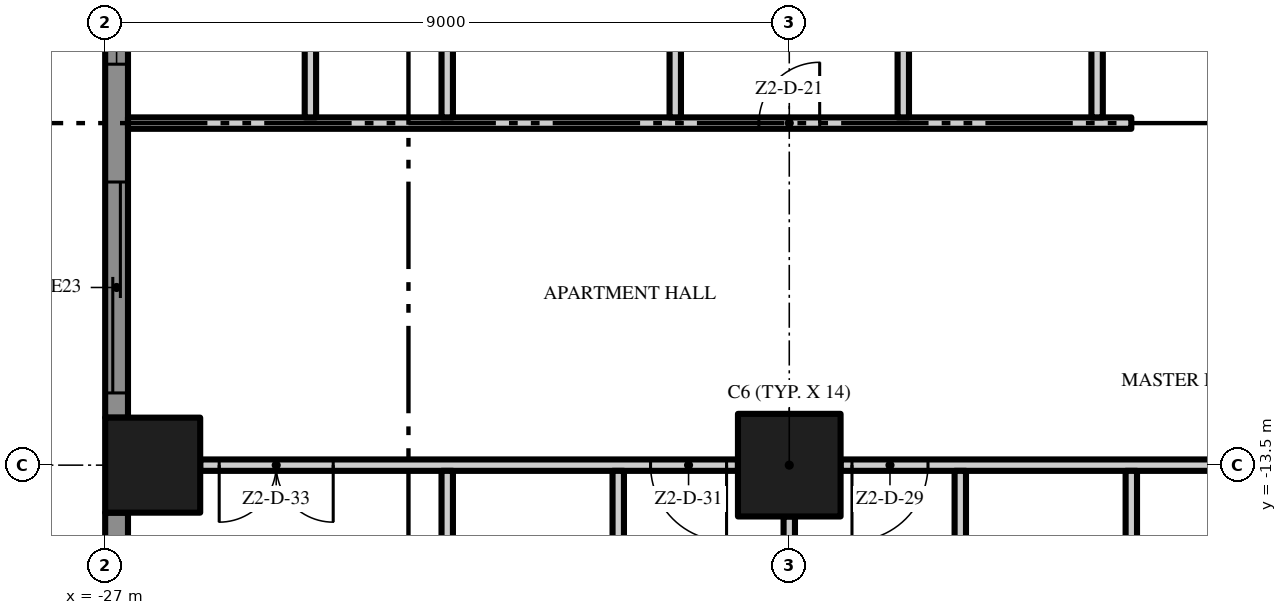
"""IFC4 building model, lengths in metres.
Left out: names, types, materials, properties, quantities, classifications, styles, units other than length and angle.
Written with IfcOpenShell. Run it as: python <this file> out.ifc"""

import sys

from ifc_helpers import new_model, si_unit, direction, frame, frame_2d, origin, origin_2d, place, context, subcontext, project, spatial, polyline, rectangle, outline, extrude, element, fill, save


model = new_model("IFC4")
c1 = context("Model", 3, precision=1e-05, world=origin(), true_north=direction((0.0, 1.0)))
c2 = subcontext(c1, "Body", "Model", "MODEL_VIEW")
j1 = project(units=[si_unit("LENGTHUNIT", "METRE"), si_unit("PLANEANGLEUNIT", "RADIAN")], contexts=[c1])
p1 = place(None, origin())
s1 = spatial("IfcSite", under=j1, at=p1, CompositionType="ELEMENT")
p2 = place(p1, origin())
s2 = spatial("IfcBuilding", under=s1, at=p2, CompositionType="ELEMENT")
p3 = place(p2, frame((0.0, 0.0, 111.2)))
s3 = spatial("IfcBuildingStorey", under=s2, at=p3, CompositionType="ELEMENT", Elevation=111.2)
p4 = place(p3, frame((-18.0, -13.5, 0.0), z_axis=(0.0, 0.0, 1.0), x_axis=(1.0, 0.0, 0.0)))
e1 = element("IfcColumn", 1, at=p4, inside=s3, PredefinedType="COLUMN", context=c2, shape_type="SweptSolid", body=[
    extrude(rectangle(XDim=1.35, YDim=1.35, at=origin_2d()), origin(), (0.0, 0.0, 1.0), 3.5),
])
p5 = place(p3, frame((-26.375, -13.5, 0.0), z_axis=(0.0, 0.0, 1.0), x_axis=(1.0, 0.0, 0.0)))
e2 = element("IfcColumn", 2, at=p5, inside=s3, PredefinedType="COLUMN", context=c2, shape_type="SweptSolid", body=[
    extrude(rectangle(XDim=1.25, YDim=1.25, at=origin_2d()), origin(), (0.0, 0.0, 1.0), 3.5),
])
p6 = place(p3, frame((-26.85, -12.875, 0.0), z_axis=(0.0, 0.0, 1.0), x_axis=(0.0, 1.0, 0.0)))
e3 = element("IfcWall", 3, at=p6, inside=s3, PredefinedType="SOLIDWALL", context=c2, shape_type="SweptSolid", body=[
    extrude(rectangle(XDim=7.75, YDim=0.3, at=frame_2d((3.875, 0.0))), origin(), (0.0, 0.0, 1.0), 3.5),
])
p7 = place(p6, frame((4.65, 0.0, 0.45)))
e4 = element("IfcOpeningElement", 4, at=p7, cuts=e3, PredefinedType="OPENING", context=c2, shape_type="SweptSolid", body=[
    extrude(rectangle(XDim=2.775, YDim=2.65, at=frame_2d((1.387, 1.325))), frame((0.0, 0.16, 0.0), z_axis=(0.0, -1.0, 0.0), x_axis=(1.0, 0.0, 0.0)), (0.0, 0.0, 1.0), 0.32),
])
p8 = place(p6, frame((0.325, 0.0, 0.0)))
e5 = element("IfcOpeningElement", 5, at=p8, cuts=e3, PredefinedType="OPENING", context=c2, shape_type="SweptSolid", body=[
    extrude(rectangle(XDim=2.775, YDim=2.4, at=frame_2d((1.387, 1.2))), frame((0.0, 0.16, 0.0), z_axis=(0.0, -1.0, 0.0), x_axis=(1.0, 0.0, 0.0)), (0.0, 0.0, 1.0), 0.32),
])
p9 = place(p3, frame((-26.85, -18.0, 0.0), z_axis=(0.0, 0.0, 1.0), x_axis=(0.0, 1.0, 0.0)))
e6 = element("IfcWall", 6, at=p9, inside=s3, PredefinedType="SOLIDWALL", context=c2, shape_type="SweptSolid", body=[
    extrude(rectangle(XDim=3.875, YDim=0.3, at=frame_2d((1.938, 0.0))), origin(), (0.0, 0.0, 1.0), 3.5),
])
p10 = place(p9, frame((0.775, 0.0, 0.0)))
e7 = element("IfcOpeningElement", 7, at=p10, cuts=e6, PredefinedType="OPENING", context=c2, shape_type="SweptSolid", body=[
    extrude(rectangle(XDim=2.775, YDim=2.4, at=frame_2d((1.387, 1.2))), frame((0.0, 0.16, 0.0), z_axis=(0.0, -1.0, 0.0), x_axis=(1.0, 0.0, 0.0)), (0.0, 0.0, 1.0), 0.32),
])
p11 = place(p3, origin())
e8 = element("IfcWall", 8, at=p11, inside=s3, PredefinedType="USERDEFINED", context=c2, shape_type="SweptSolid", body=[
    extrude(outline(polyline([(-29.649, 18.0), (-29.985, 16.5), (-30.0, 16.125), (-29.869, 15.0), (-29.345, 13.5), (-28.612, 12.0), (-27.951, 10.5), (-27.615, 9.0), (-27.6, 8.625), (-27.731, 7.5), (-28.255, 6.0), (-28.988, 4.5), (-29.649, 3.0), (-29.985, 1.5), (-30.0, 1.125), (-29.869, 0.0), (-29.345, -1.5), (-28.612, -3.0), (-27.951, -4.5), (-27.615, -6.0), (-27.6, -6.375), (-27.731, -7.5), (-28.255, -9.0), (-28.988, -10.5), (-29.649, -12.0), (-29.985, -13.5), (-30.0, -13.875), (-29.869, -15.0), (-29.345, -16.5), (-28.612, -18.0), (-28.388, -17.89), (-29.114, -16.404), (-29.624, -14.944), (-29.749, -13.865), (-29.736, -13.533), (-29.41, -12.079), (-28.761, -10.605), (-28.024, -9.096), (-27.486, -7.556), (-27.349, -6.385), (-27.366, -5.967), (-27.713, -4.421), (-28.385, -2.895), (-29.114, -1.404), (-29.624, 0.056), (-29.749, 1.135), (-29.736, 1.467), (-29.41, 2.921), (-28.761, 4.395), (-28.024, 5.904), (-27.486, 7.444), (-27.349, 8.615), (-27.366, 9.033), (-27.713, 10.579), (-28.385, 12.105), (-29.114, 13.596), (-29.624, 15.056), (-29.749, 16.135), (-29.736, 16.467), (-29.405, 17.945), (-29.649, 18.0)])), origin(), (0.0, 0.0, 1.0), 0.9),
])
p12 = place(p3, frame((-18.675, -13.5, 0.0), z_axis=(0.0, 0.0, 1.0), x_axis=(-1.0, 0.0, 0.0)))
e9 = element("IfcWall", 9, at=p12, inside=s3, PredefinedType="PARTITIONING", context=c2, shape_type="SweptSolid", body=[
    extrude(rectangle(XDim=7.075, YDim=0.15, at=frame_2d((3.538, 0.0))), origin(), (0.0, 0.0, 1.0), 3.5),
])
p13 = place(p12, frame((0.15, 0.0, 0.0)))
e10 = element("IfcOpeningElement", 10, at=p13, cuts=e9, PredefinedType="OPENING", context=c2, shape_type="SweptSolid", body=[
    extrude(rectangle(XDim=1.0, YDim=2.4, at=frame_2d((0.5, 1.2))), frame((0.0, 0.085, 0.0), z_axis=(0.0, -1.0, 0.0), x_axis=(1.0, 0.0, 0.0)), (0.0, 0.0, 1.0), 0.17),
])
p14 = place(p12, frame((5.325, 0.0, 0.0)))
e11 = element("IfcOpeningElement", 11, at=p14, cuts=e9, PredefinedType="OPENING", context=c2, shape_type="SweptSolid", body=[
    extrude(rectangle(XDim=1.5, YDim=2.4, at=frame_2d((0.75, 1.2))), frame((0.0, 0.085, 0.0), z_axis=(0.0, -1.0, 0.0), x_axis=(1.0, 0.0, 0.0)), (0.0, 0.0, 1.0), 0.17),
])
p15 = place(p3, frame((-9.675, -13.5, 0.0), z_axis=(0.0, 0.0, 1.0), x_axis=(-1.0, 0.0, 0.0)))
e12 = element("IfcWall", 12, at=p15, inside=s3, PredefinedType="PARTITIONING", context=c2, shape_type="SweptSolid", body=[
    extrude(rectangle(XDim=7.65, YDim=0.15, at=frame_2d((3.825, 0.0))), origin(), (0.0, 0.0, 1.0), 3.5),
])
p16 = place(p15, frame((0.15, 0.0, 0.0)))
e13 = element("IfcOpeningElement", 13, at=p16, cuts=e12, PredefinedType="OPENING", context=c2, shape_type="SweptSolid", body=[
    extrude(rectangle(XDim=1.0, YDim=2.4, at=frame_2d((0.5, 1.2))), frame((0.0, 0.085, 0.0), z_axis=(0.0, -1.0, 0.0), x_axis=(1.0, 0.0, 0.0)), (0.0, 0.0, 1.0), 0.17),
])
p17 = place(p15, frame((6.5, 0.0, 0.0)))
e14 = element("IfcOpeningElement", 14, at=p17, cuts=e12, PredefinedType="OPENING", context=c2, shape_type="SweptSolid", body=[
    extrude(rectangle(XDim=1.0, YDim=2.4, at=frame_2d((0.5, 1.2))), frame((0.0, 0.085, 0.0), z_axis=(0.0, -1.0, 0.0), x_axis=(1.0, 0.0, 0.0)), (0.0, 0.0, 1.0), 0.17),
])
p18 = place(p3, frame((-26.7, -9.0, 0.0), z_axis=(0.0, 0.0, 1.0), x_axis=(1.0, 0.0, 0.0)))
e15 = element("IfcWall", 15, at=p18, inside=s3, PredefinedType="PARTITIONING", context=c2, shape_type="SweptSolid", body=[
    extrude(rectangle(XDim=13.2, YDim=0.15, at=frame_2d((6.6, 0.0))), origin(), (0.0, 0.0, 1.0), 3.5),
])
p19 = place(p18, frame((8.3, 0.0, 0.0)))
e16 = element("IfcOpeningElement", 16, at=p19, cuts=e15, PredefinedType="OPENING", context=c2, shape_type="SweptSolid", body=[
    extrude(rectangle(XDim=0.8, YDim=2.0, at=frame_2d((0.4, 1.0))), frame((0.0, 0.085, 0.0), z_axis=(0.0, -1.0, 0.0), x_axis=(1.0, 0.0, 0.0)), (0.0, 0.0, 1.0), 0.17),
])
p20 = place(p3, frame((-24.3, -8.925, 0.0), z_axis=(0.0, 0.0, 1.0), x_axis=(0.0, 1.0, 0.0)))
e17 = element("IfcWall", 17, at=p20, inside=s3, PredefinedType="PARTITIONING", context=c2, shape_type="SweptSolid", body=[
    extrude(rectangle(XDim=4.35, YDim=0.15, at=frame_2d((2.175, 0.0))), origin(), (0.0, 0.0, 1.0), 3.5),
])
p21 = place(p3, frame((-22.5, -17.375, 0.0), z_axis=(0.0, 0.0, 1.0), x_axis=(0.0, 1.0, 0.0)))
e18 = element("IfcWall", 18, at=p21, inside=s3, PredefinedType="PARTITIONING", context=c2, shape_type="SweptSolid", body=[
    extrude(rectangle(XDim=3.8, YDim=0.15, at=frame_2d((1.9, 0.0))), origin(), (0.0, 0.0, 1.0), 3.5),
])
p22 = place(p3, frame((-22.5, -8.925, 0.0), z_axis=(0.0, 0.0, 1.0), x_axis=(0.0, 1.0, 0.0)))
e19 = element("IfcWall", 19, at=p22, inside=s3, PredefinedType="PARTITIONING", context=c2, shape_type="SweptSolid", body=[
    extrude(rectangle(XDim=4.35, YDim=0.15, at=frame_2d((2.175, 0.0))), origin(), (0.0, 0.0, 1.0), 3.5),
])
p23 = place(p3, frame((-20.25, -16.575, 0.0), z_axis=(0.0, 0.0, 1.0), x_axis=(0.0, 1.0, 0.0)))
e20 = element("IfcWall", 20, at=p23, inside=s3, PredefinedType="PARTITIONING", context=c2, shape_type="SweptSolid", body=[
    extrude(rectangle(XDim=3.0, YDim=0.15, at=frame_2d((1.5, 0.0))), origin(), (0.0, 0.0, 1.0), 3.5),
])
p24 = place(p3, frame((-19.5, -8.925, 0.0), z_axis=(0.0, 0.0, 1.0), x_axis=(0.0, 1.0, 0.0)))
e21 = element("IfcWall", 21, at=p24, inside=s3, PredefinedType="PARTITIONING", context=c2, shape_type="SweptSolid", body=[
    extrude(rectangle(XDim=4.35, YDim=0.15, at=frame_2d((2.175, 0.0))), origin(), (0.0, 0.0, 1.0), 3.5),
])
p25 = place(p3, frame((-18.0, -21.25, 0.0), z_axis=(0.0, 0.0, 1.0), x_axis=(0.0, 1.0, 0.0)))
e22 = element("IfcWall", 22, at=p25, inside=s3, PredefinedType="PARTITIONING", context=c2, shape_type="SweptSolid", body=[
    extrude(rectangle(XDim=7.075, YDim=0.15, at=frame_2d((3.538, 0.0))), origin(), (0.0, 0.0, 1.0), 3.5),
])
p26 = place(p3, frame((-16.5, -8.925, 0.0), z_axis=(0.0, 0.0, 1.0), x_axis=(0.0, 1.0, 0.0)))
e23 = element("IfcWall", 23, at=p26, inside=s3, PredefinedType="PARTITIONING", context=c2, shape_type="SweptSolid", body=[
    extrude(rectangle(XDim=4.35, YDim=0.15, at=frame_2d((2.175, 0.0))), origin(), (0.0, 0.0, 1.0), 3.5),
])
p27 = place(p3, frame((-15.75, -16.575, 0.0), z_axis=(0.0, 0.0, 1.0), x_axis=(0.0, 1.0, 0.0)))
e24 = element("IfcWall", 24, at=p27, inside=s3, PredefinedType="PARTITIONING", context=c2, shape_type="SweptSolid", body=[
    extrude(rectangle(XDim=3.0, YDim=0.15, at=frame_2d((1.5, 0.0))), origin(), (0.0, 0.0, 1.0), 3.5),
])
p28 = place(p3, frame((-13.95, -8.925, 0.0), z_axis=(0.0, 0.0, 1.0), x_axis=(0.0, 1.0, 0.0)))
e25 = element("IfcWall", 25, at=p28, inside=s3, PredefinedType="PARTITIONING", context=c2, shape_type="SweptSolid", body=[
    extrude(rectangle(XDim=4.5, YDim=0.15, at=frame_2d((2.25, 0.0))), origin(), (0.0, 0.0, 1.0), 3.5),
])
p29 = place(p3, frame((-13.5, -22.2, 0.0), z_axis=(0.0, 0.0, 1.0), x_axis=(0.0, 1.0, 0.0)))
e26 = element("IfcWall", 26, at=p29, inside=s3, PredefinedType="PARTITIONING", context=c2, shape_type="SweptSolid", body=[
    extrude(rectangle(XDim=8.625, YDim=0.15, at=frame_2d((4.312, 0.0))), origin(), (0.0, 0.0, 1.0), 3.5),
])
p30 = place(p7, origin())
e27 = element("IfcWindow", 27, at=p30, inside=s3, PartitioningType="SINGLE_PANEL", PredefinedType="WINDOW", context=c2, shape_type="SweptSolid", body=[
    extrude(rectangle(XDim=2.775, YDim=2.65, at=frame_2d((1.387, 1.325))), frame((0.0, 0.03, 0.0), z_axis=(0.0, -1.0, 0.0), x_axis=(1.0, 0.0, 0.0)), (0.0, 0.0, 1.0), 0.06),
])
fill(e4, e27)
p31 = place(p8, origin())
e28 = element("IfcDoor", 28, at=p31, inside=s3, OperationType="SINGLE_SWING_LEFT", PredefinedType="DOOR", context=c2, shape_type="SweptSolid", body=[
    extrude(rectangle(XDim=2.775, YDim=2.4, at=frame_2d((1.387, 1.2))), frame((0.0, 0.025, 0.0), z_axis=(0.0, -1.0, 0.0), x_axis=(1.0, 0.0, 0.0)), (0.0, 0.0, 1.0), 0.05),
])
fill(e5, e28)
p32 = place(p19, origin())
e29 = element("IfcDoor", 29, at=p32, inside=s3, OperationType="SINGLE_SWING_RIGHT", PredefinedType="DOOR", context=c2, shape_type="SweptSolid", body=[
    extrude(rectangle(XDim=0.8, YDim=2.0, at=frame_2d((0.4, 1.0))), frame((0.0, 0.025, 0.0), z_axis=(0.0, -1.0, 0.0), x_axis=(1.0, 0.0, 0.0)), (0.0, 0.0, 1.0), 0.05),
])
fill(e16, e29)
p33 = place(p17, origin())
e30 = element("IfcDoor", 30, at=p33, inside=s3, OperationType="SINGLE_SWING_RIGHT", PredefinedType="DOOR", context=c2, shape_type="SweptSolid", body=[
    extrude(rectangle(XDim=1.0, YDim=2.4, at=frame_2d((0.5, 1.2))), frame((0.0, 0.025, 0.0), z_axis=(0.0, -1.0, 0.0), x_axis=(1.0, 0.0, 0.0)), (0.0, 0.0, 1.0), 0.05),
])
fill(e14, e30)
p34 = place(p13, origin())
e31 = element("IfcDoor", 31, at=p34, inside=s3, OperationType="SINGLE_SWING_LEFT", PredefinedType="DOOR", context=c2, shape_type="SweptSolid", body=[
    extrude(rectangle(XDim=1.0, YDim=2.4, at=frame_2d((0.5, 1.2))), frame((0.0, 0.025, 0.0), z_axis=(0.0, -1.0, 0.0), x_axis=(1.0, 0.0, 0.0)), (0.0, 0.0, 1.0), 0.05),
])
fill(e10, e31)
p35 = place(p14, origin())
e32 = element("IfcDoor", 32, at=p35, inside=s3, OperationType="DOUBLE_DOOR_SINGLE_SWING", PredefinedType="DOOR", context=c2, shape_type="SweptSolid", body=[
    extrude(rectangle(XDim=1.5, YDim=2.4, at=frame_2d((0.75, 1.2))), frame((0.0, 0.025, 0.0), z_axis=(0.0, -1.0, 0.0), x_axis=(1.0, 0.0, 0.0)), (0.0, 0.0, 1.0), 0.05),
])
fill(e11, e32)
save(model, sys.argv[1])
